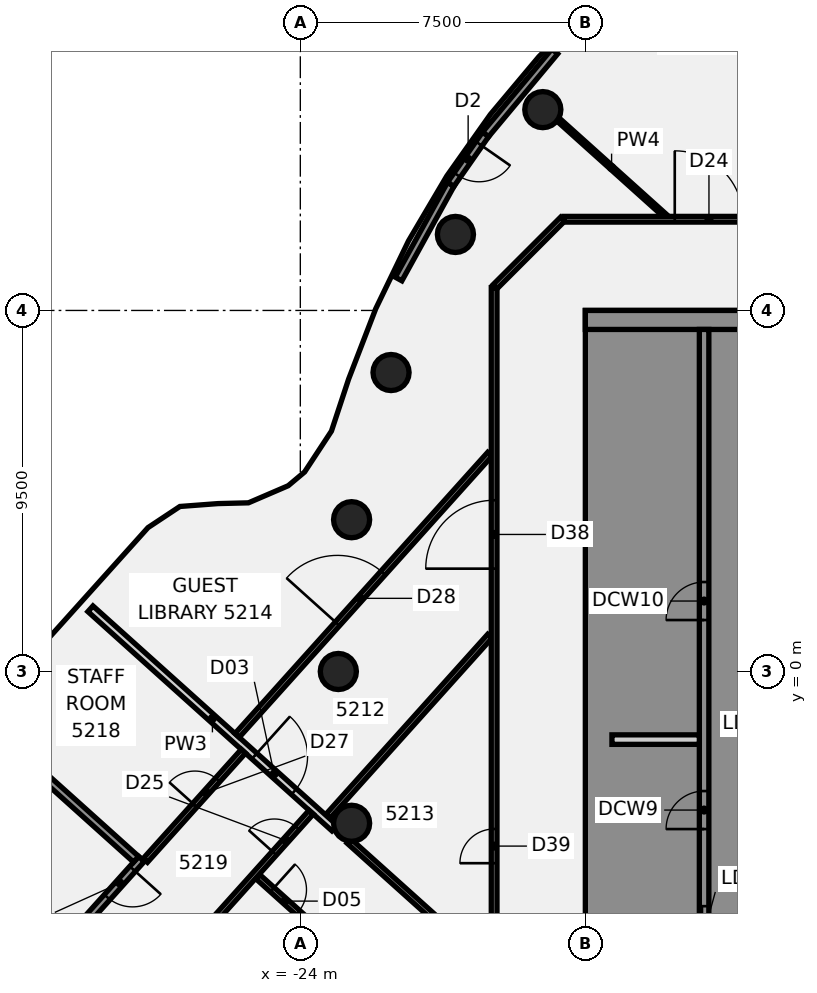
"""IFC4 building model, lengths in metres.
Left out: names, types, materials, properties, quantities, classifications, styles, units other than length and angle.
Written with IfcOpenShell. Run it as: python <this file> out.ifc"""

import sys

from ifc_helpers import new_model, si_unit, direction, frame, frame_2d, origin, origin_2d, place, context, subcontext, project, spatial, polyline, rectangle, circle, outline, extrude, element, fill, save


model = new_model("IFC4")
c1 = context("Model", 3, precision=1e-05, world=origin(), true_north=direction((0.0, 1.0)))
c2 = subcontext(c1, "Body", "Model", "MODEL_VIEW")
j1 = project(units=[si_unit("LENGTHUNIT", "METRE"), si_unit("PLANEANGLEUNIT", "RADIAN")], contexts=[c1])
p1 = place(None, origin())
s1 = spatial("IfcSite", under=j1, at=p1, CompositionType="ELEMENT")
p2 = place(p1, origin())
s2 = spatial("IfcBuilding", under=s1, at=p2, CompositionType="ELEMENT")
p3 = place(p2, frame((0.0, 0.0, 207.7)))
s3 = spatial("IfcBuildingStorey", under=s2, at=p3, CompositionType="ELEMENT", Elevation=207.7)
for number, where, z_axis, x_axis in (
    (1, (-17.619, 14.784, -0.14), (0.0, 0.0, 1.0), (1.0, 0.0, 0.0)),
    (2, (-19.919, 11.5, -0.14), (0.0, 0.0, 1.0), (1.0, 0.0, 0.0)),
    (3, (-21.613, 7.866, -0.14), (0.0, 0.0, 1.0), (1.0, 0.0, 0.0)),
    (4, (-22.651, 3.994, -0.14), (0.0, 0.0, 1.0), (1.0, 0.0, 0.0)),
    (5, (-23.0, 0.0, -0.14), (0.0, 0.0, 1.0), (1.0, 0.0, 0.0)),
    (6, (-22.651, -3.994, -0.14), (0.0, 0.0, 1.0), (1.0, 0.0, 0.0)),
):
    element("IfcColumn", number, at=place(p3, frame(where, z_axis=z_axis, x_axis=x_axis)), inside=s3, PredefinedType="COLUMN", context=c2, shape_type="SweptSolid", body=[
        extrude(circle(Radius=0.475, at=origin_2d()), origin(), (0.0, 0.0, 1.0), 3.6),
    ])
p4 = place(p3, frame((-29.523, 1.65, 0.0), z_axis=(0.0, 0.0, 1.0), x_axis=(0.743912674532, -0.668276838346, 0.0)))
e7 = element("IfcWall", 7, at=p4, inside=s3, PredefinedType="PARTITIONING", context=c2, shape_type="SweptSolid", body=[
    extrude(rectangle(XDim=8.631, YDim=0.2, at=frame_2d((4.316, 0.0))), origin(), (0.0, 0.0, 1.0), 2.864),
])
p5 = place(p4, frame((5.8, 0.0, 0.0)))
e8 = element("IfcOpeningElement", 8, at=p5, cuts=e7, PredefinedType="OPENING", context=c2, shape_type="SweptSolid", body=[
    extrude(rectangle(XDim=1.4, YDim=2.1, at=frame_2d((0.7, 1.05))), frame((0.0, 0.11, 0.0), z_axis=(0.0, -1.0, 0.0), x_axis=(1.0, 0.0, 0.0)), (0.0, 0.0, 1.0), 0.22),
])
p6 = place(p3, frame((-22.722, -4.46, 0.0), z_axis=(0.0, 0.0, 1.0), x_axis=(0.743940554758, -0.668245801323, 0.0)))
e9 = element("IfcWall", 9, at=p6, inside=s3, PredefinedType="PARTITIONING", context=c2, shape_type="SweptSolid", body=[
    extrude(rectangle(XDim=4.993, YDim=0.15, at=frame_2d((2.497, 0.0))), origin(), (0.0, 0.0, 1.0), 2.864),
])
p7 = place(p3, frame((-25.125, -5.394, 0.0), z_axis=(0.0, 0.0, 1.0), x_axis=(0.743993991254, -0.668186307087, 0.0)))
e10 = element("IfcWall", 10, at=p7, inside=s3, PredefinedType="PARTITIONING", context=c2, shape_type="SweptSolid", body=[
    extrude(rectangle(XDim=2.444, YDim=0.15, at=frame_2d((1.222, 0.0))), origin(), (0.0, 0.0, 1.0), 2.864),
])
p8 = place(p7, frame((0.52, 0.0, 0.0)))
e11 = element("IfcOpeningElement", 11, at=p8, cuts=e10, PredefinedType="OPENING", context=c2, shape_type="SweptSolid", body=[
    extrude(rectangle(XDim=0.9, YDim=2.1, at=frame_2d((0.45, 1.05))), frame((0.0, 0.085, 0.0), z_axis=(0.0, -1.0, 0.0), x_axis=(1.0, 0.0, 0.0)), (0.0, 0.0, 1.0), 0.17),
])
p9 = place(p3, frame((-17.217, 14.523, 0.0), z_axis=(0.0, 0.0, 1.0), x_axis=(0.743919147791, -0.668269632372, 0.0)))
e12 = element("IfcWall", 12, at=p9, inside=s3, PredefinedType="PARTITIONING", context=c2, shape_type="SweptSolid", body=[
    extrude(rectangle(XDim=3.786, YDim=0.1, at=frame_2d((1.893, 0.0))), origin(), (0.0, 0.0, 1.0), 2.864),
])
p10 = place(p3, frame((-17.065, 11.9, 0.0), z_axis=(0.0, 0.0, 1.0), x_axis=(1.0, 0.0, 0.0)))
e13 = element("IfcWall", 13, at=p10, inside=s3, PredefinedType="PARTITIONING", context=c2, shape_type="SweptSolid", body=[
    extrude(rectangle(XDim=34.165, YDim=0.15, at=frame_2d((17.083, 0.0))), origin(), (0.0, 0.0, 1.0), 2.864),
])
p11 = place(p10, frame((24.119, 0.0, 0.0)))
e14 = element("IfcOpeningElement", 14, at=p11, cuts=e13, PredefinedType="OPENING", context=c2, shape_type="SweptSolid", body=[
    extrude(rectangle(XDim=1.8, YDim=2.1, at=frame_2d((0.9, 1.05))), frame((0.0, 0.085, 0.0), z_axis=(0.0, -1.0, 0.0), x_axis=(1.0, 0.0, 0.0)), (0.0, 0.0, 1.0), 0.17),
])
p12 = place(p10, frame((8.918, 0.0, 0.0)))
e15 = element("IfcOpeningElement", 15, at=p12, cuts=e13, PredefinedType="OPENING", context=c2, shape_type="SweptSolid", body=[
    extrude(rectangle(XDim=1.8, YDim=2.1, at=frame_2d((0.9, 1.05))), frame((0.0, 0.085, 0.0), z_axis=(0.0, -1.0, 0.0), x_axis=(1.0, 0.0, 0.0)), (0.0, 0.0, 1.0), 0.17),
])
p13 = place(p10, frame((2.918, 0.0, 0.0)))
e16 = element("IfcOpeningElement", 16, at=p13, cuts=e13, PredefinedType="OPENING", context=c2, shape_type="SweptSolid", body=[
    extrude(rectangle(XDim=1.8, YDim=2.1, at=frame_2d((0.9, 1.05))), frame((0.0, 0.085, 0.0), z_axis=(0.0, -1.0, 0.0), x_axis=(1.0, 0.0, 0.0)), (0.0, 0.0, 1.0), 0.17),
])
p14 = place(p3, frame((-18.872, 10.128, 0.0), z_axis=(0.0, 0.0, 1.0), x_axis=(0.707106781187, 0.707106781187, 0.0)))
e17 = element("IfcWall", 17, at=p14, inside=s3, PredefinedType="PARTITIONING", context=c2, shape_type="SweptSolid", body=[
    extrude(rectangle(XDim=2.505, YDim=0.15, at=frame_2d((1.253, 0.0))), origin(), (0.0, 0.0, 1.0), 2.864),
])
p15 = place(p3, frame((-29.608, -10.263, 0.0), z_axis=(0.0, 0.0, 1.0), x_axis=(0.668251718521, 0.743935239583, 0.0)))
e18 = element("IfcWall", 18, at=p15, inside=s3, PredefinedType="PARTITIONING", context=c2, shape_type="SweptSolid", body=[
    extrude(rectangle(XDim=8.819, YDim=0.15, at=frame_2d((4.41, 0.0))), origin(), (0.0, 0.0, 1.0), 2.864),
])
p16 = place(p15, frame((7.369, 0.0, 0.0)))
e19 = element("IfcOpeningElement", 19, at=p16, cuts=e18, PredefinedType="OPENING", context=c2, shape_type="SweptSolid", body=[
    extrude(rectangle(XDim=0.9, YDim=2.1, at=frame_2d((0.45, 1.05))), frame((0.0, 0.085, 0.0), z_axis=(0.0, -1.0, 0.0), x_axis=(1.0, 0.0, 0.0)), (0.0, 0.0, 1.0), 0.17),
])
p17 = place(p15, frame((0.82, 0.0, 0.0)))
e20 = element("IfcOpeningElement", 20, at=p17, cuts=e18, PredefinedType="OPENING", context=c2, shape_type="SweptSolid", body=[
    extrude(rectangle(XDim=0.9, YDim=2.1, at=frame_2d((0.45, 1.05))), frame((0.0, 0.085, 0.0), z_axis=(0.0, -1.0, 0.0), x_axis=(1.0, 0.0, 0.0)), (0.0, 0.0, 1.0), 0.17),
])
p18 = place(p3, frame((-28.078, -4.97, 0.0), z_axis=(0.0, 0.0, 1.0), x_axis=(0.668366899889, 0.743831759965, 0.0)))
e21 = element("IfcWall", 21, at=p18, inside=s3, PredefinedType="PARTITIONING", context=c2, shape_type="SweptSolid", body=[
    extrude(rectangle(XDim=3.86, YDim=0.15, at=frame_2d((1.93, 0.0))), origin(), (0.0, 0.0, 1.0), 2.864),
])
p19 = place(p18, frame((1.95, 0.0, 0.0)))
e22 = element("IfcOpeningElement", 22, at=p19, cuts=e21, PredefinedType="OPENING", context=c2, shape_type="SweptSolid", body=[
    extrude(rectangle(XDim=0.9, YDim=2.1, at=frame_2d((0.45, 1.05))), frame((0.0, 0.085, 0.0), z_axis=(0.0, -1.0, 0.0), x_axis=(1.0, 0.0, 0.0)), (0.0, 0.0, 1.0), 0.17),
])
p20 = place(p3, frame((-25.663, -1.683, 0.0), z_axis=(0.0, 0.0, 1.0), x_axis=(0.668369322351, 0.743829583265, 0.0)))
e23 = element("IfcWall", 23, at=p20, inside=s3, PredefinedType="PARTITIONING", context=c2, shape_type="SweptSolid", body=[
    extrude(rectangle(XDim=9.949, YDim=0.15, at=frame_2d((4.974, 0.0))), origin(), (0.0, 0.0, 1.0), 2.864),
])
p21 = place(p20, frame((3.95, 0.0, 0.0)))
e24 = element("IfcOpeningElement", 24, at=p21, cuts=e23, PredefinedType="OPENING", context=c2, shape_type="SweptSolid", body=[
    extrude(rectangle(XDim=1.8, YDim=2.1, at=frame_2d((0.9, 1.05))), frame((0.0, 0.085, 0.0), z_axis=(0.0, -1.0, 0.0), x_axis=(1.0, 0.0, 0.0)), (0.0, 0.0, 1.0), 0.17),
])
p22 = place(p3, frame((-23.27, -3.807, 0.0), z_axis=(0.0, 0.0, 1.0), x_axis=(0.668392601197, 0.74380866536, 0.0)))
e25 = element("IfcWall", 25, at=p22, inside=s3, PredefinedType="PARTITIONING", context=c2, shape_type="SweptSolid", body=[
    extrude(rectangle(XDim=6.368, YDim=0.15, at=frame_2d((3.184, 0.0))), origin(), (0.0, 0.0, 1.0), 2.864),
])
p23 = place(p3, frame((-18.9, -10.1, 0.0), z_axis=(0.0, 0.0, 1.0), x_axis=(0.0, 1.0, 0.0)))
e26 = element("IfcWall", 26, at=p23, inside=s3, PredefinedType="PARTITIONING", context=c2, shape_type="SweptSolid", body=[
    extrude(rectangle(XDim=20.2, YDim=0.15, at=frame_2d((10.1, 0.0))), origin(), (0.0, 0.0, 1.0), 2.864),
])
p24 = place(p23, frame((12.806, 0.0, 0.0)))
e27 = element("IfcOpeningElement", 27, at=p24, cuts=e26, PredefinedType="OPENING", context=c2, shape_type="SweptSolid", body=[
    extrude(rectangle(XDim=1.8, YDim=2.1, at=frame_2d((0.9, 1.05))), frame((0.0, 0.085, 0.0), z_axis=(0.0, -1.0, 0.0), x_axis=(1.0, 0.0, 0.0)), (0.0, 0.0, 1.0), 0.17),
])
p25 = place(p23, frame((5.056, 0.0, 0.0)))
e28 = element("IfcOpeningElement", 28, at=p25, cuts=e26, PredefinedType="OPENING", context=c2, shape_type="SweptSolid", body=[
    extrude(rectangle(XDim=0.9, YDim=2.1, at=frame_2d((0.45, 1.05))), frame((0.0, 0.085, 0.0), z_axis=(0.0, -1.0, 0.0), x_axis=(1.0, 0.0, 0.0)), (0.0, 0.0, 1.0), 0.17),
])
p26 = place(p3, frame((-17.304, 16.315, 0.0), z_axis=(0.0, 0.0, 1.0), x_axis=(-0.640631790318, -0.767848233203, 0.0)))
e29 = element("IfcWall", 29, at=p26, inside=s3, PredefinedType="SOLIDWALL", context=c2, shape_type="SweptSolid", body=[
    extrude(rectangle(XDim=2.844, YDim=0.2, at=frame_2d((1.422, 0.0))), origin(), (0.0, 0.0, 1.0), 3.46),
])
p27 = place(p3, frame((-20.042, 12.82, 0.0), z_axis=(0.0, 0.0, 1.0), x_axis=(-0.482827762378, -0.87571533724, 0.0)))
e30 = element("IfcWall", 30, at=p27, inside=s3, PredefinedType="SOLIDWALL", context=c2, shape_type="SweptSolid", body=[
    extrude(rectangle(XDim=2.845, YDim=0.2, at=frame_2d((1.422, 0.0))), origin(), (0.0, 0.0, 1.0), 3.46),
])
p28 = place(p3, frame((-19.126, 14.132, 0.0), z_axis=(0.0, 0.0, 1.0), x_axis=(-0.572150562029, -0.820148605053, 0.0)))
e31 = element("IfcWall", 31, at=p28, inside=s3, PredefinedType="SOLIDWALL", context=c2, shape_type="SweptSolid", body=[
    extrude(rectangle(XDim=1.6, YDim=0.2, at=frame_2d((0.8, 0.0))), origin(), (0.0, 0.0, 1.0), 3.46),
])
p29 = place(p28, frame((0.3, 0.0, 0.0)))
e32 = element("IfcOpeningElement", 32, at=p29, cuts=e31, PredefinedType="OPENING", context=c2, shape_type="SweptSolid", body=[
    extrude(rectangle(XDim=1.0, YDim=2.4, at=frame_2d((0.5, 1.2))), frame((0.0, 0.11, 0.0), z_axis=(0.0, -1.0, 0.0), x_axis=(1.0, 0.0, 0.0)), (0.0, 0.0, 1.0), 0.22),
])
p30 = place(p3, origin())
e33 = element("IfcWall", 33, at=p30, inside=s3, PredefinedType="SHEAR", context=c2, shape_type="SweptSolid", body=[
    extrude(outline(polyline([(-13.5, -8.125), (-16.0, -8.125), (-16.0, -5.625), (-13.5, -5.625), (-13.5, -5.375), (-16.0, -5.375), (-16.0, 5.375), (-13.5, 5.375), (-13.5, 5.625), (-16.0, 5.625), (-16.0, 8.125), (-13.5, 8.125), (-13.5, 9.0), (-16.0, 9.0), (-16.5, 9.0), (-16.5, -9.0), (-16.0, -9.0), (-13.5, -9.0), (-13.5, -8.125)])), origin(), (0.0, 0.0, 1.0), 3.46),
])
p31 = place(p3, frame((-16.5, 9.25, 0.0), z_axis=(0.0, 0.0, 1.0), x_axis=(1.0, 0.0, 0.0)))
e34 = element("IfcWall", 34, at=p31, inside=s3, PredefinedType="SHEAR", context=c2, shape_type="SweptSolid", body=[
    extrude(rectangle(XDim=13.0, YDim=0.5, at=frame_2d((6.5, 0.0))), origin(), (0.0, 0.0, 1.0), 3.46),
])
p32 = place(p3, frame((-13.375, -9.0, 0.0), z_axis=(0.0, 0.0, 1.0), x_axis=(0.0, 1.0, 0.0)))
e35 = element("IfcWall", 35, at=p32, inside=s3, PredefinedType="SHEAR", context=c2, shape_type="SweptSolid", body=[
    extrude(rectangle(XDim=18.0, YDim=0.25, at=frame_2d((9.0, 0.0))), origin(), (0.0, 0.0, 1.0), 3.46),
])
p33 = place(p32, frame((1.425, 0.0, 0.0)))
e36 = element("IfcOpeningElement", 36, at=p33, cuts=e35, PredefinedType="OPENING", context=c2, shape_type="SweptSolid", body=[
    extrude(rectangle(XDim=1.4, YDim=2.1, at=frame_2d((0.7, 1.05))), frame((0.0, 0.135, 0.0), z_axis=(0.0, -1.0, 0.0), x_axis=(1.0, 0.0, 0.0)), (0.0, 0.0, 1.0), 0.27),
])
p34 = place(p32, frame((4.854, 0.0, 0.0)))
e37 = element("IfcOpeningElement", 37, at=p34, cuts=e35, PredefinedType="OPENING", context=c2, shape_type="SweptSolid", body=[
    extrude(rectangle(XDim=1.0, YDim=2.1, at=frame_2d((0.5, 1.05))), frame((0.0, 0.135, 0.0), z_axis=(0.0, -1.0, 0.0), x_axis=(1.0, 0.0, 0.0)), (0.0, 0.0, 1.0), 0.27),
])
p35 = place(p32, frame((10.354, 0.0, 0.0)))
e38 = element("IfcOpeningElement", 38, at=p35, cuts=e35, PredefinedType="OPENING", context=c2, shape_type="SweptSolid", body=[
    extrude(rectangle(XDim=1.0, YDim=2.1, at=frame_2d((0.5, 1.05))), frame((0.0, 0.135, 0.0), z_axis=(0.0, -1.0, 0.0), x_axis=(1.0, 0.0, 0.0)), (0.0, 0.0, 1.0), 0.27),
])
p36 = place(p3, frame((-15.8, -1.792, 0.0), z_axis=(0.0, 0.0, 1.0), x_axis=(1.0, 0.0, 0.0)))
e39 = element("IfcWall", 39, at=p36, inside=s3, PredefinedType="PARTITIONING", context=c2, shape_type="SweptSolid", body=[
    extrude(rectangle(XDim=2.3, YDim=0.25, at=frame_2d((1.15, 0.0))), origin(), (0.0, 0.0, 1.0), 3.46),
])
p37 = place(p3, frame((-28.18, -4.933, -0.14), z_axis=(0.0, 0.0, 1.0), x_axis=(-0.66832831342, -0.743866429865, 0.0)))
e40 = element("IfcWall", 40, at=p37, inside=s3, PredefinedType="SHEAR", context=c2, shape_type="SweptSolid", body=[
    extrude(rectangle(XDim=6.7, YDim=0.2, at=frame_2d((3.35, 0.0))), origin(), (0.0, 0.0, 1.0), 3.004),
])
p38 = place(p37, frame((0.35, 0.0, 0.0)))
e41 = element("IfcOpeningElement", 41, at=p38, cuts=e40, PredefinedType="OPENING", context=c2, shape_type="SweptSolid", body=[
    extrude(rectangle(XDim=1.0, YDim=2.1, at=frame_2d((0.5, 1.05))), frame((0.0, 0.11, 0.0), z_axis=(0.0, -1.0, 0.0), x_axis=(1.0, 0.0, 0.0)), (0.0, 0.0, 1.0), 0.22),
])
p39 = place(p3, frame((-30.702, -2.802, -0.14), z_axis=(0.0, 0.0, 1.0), x_axis=(0.743824989784, -0.66837443441, 0.0)))
e42 = element("IfcWall", 42, at=p39, inside=s3, PredefinedType="SHEAR", context=c2, shape_type="SweptSolid", body=[
    extrude(rectangle(XDim=3.2, YDim=0.2, at=frame_2d((1.6, 0.0))), origin(), (0.0, 0.0, 1.0), 3.004),
])
p40 = place(p5, origin())
e43 = element("IfcDoor", 43, at=p40, inside=s3, OperationType="DOUBLE_DOOR_SINGLE_SWING", PredefinedType="DOOR", context=c2, shape_type="SweptSolid", body=[
    extrude(rectangle(XDim=1.4, YDim=2.1, at=frame_2d((0.7, 1.05))), frame((0.0, 0.025, 0.0), z_axis=(0.0, -1.0, 0.0), x_axis=(1.0, 0.0, 0.0)), (0.0, 0.0, 1.0), 0.05),
])
fill(e8, e43)
p41 = place(p8, frame((0.9, 0.0, 0.0), z_axis=(0.0, 0.0, 1.0), x_axis=(-1.0, 0.0, 0.0)))
e44 = element("IfcDoor", 44, at=p41, inside=s3, OperationType="SINGLE_SWING_LEFT", PredefinedType="DOOR", context=c2, shape_type="SweptSolid", body=[
    extrude(rectangle(XDim=0.9, YDim=2.1, at=frame_2d((0.45, 1.05))), frame((0.0, 0.025, 0.0), z_axis=(0.0, -1.0, 0.0), x_axis=(1.0, 0.0, 0.0)), (0.0, 0.0, 1.0), 0.05),
])
fill(e11, e44)
p42 = place(p13, origin())
e45 = element("IfcDoor", 45, at=p42, inside=s3, OperationType="DOUBLE_DOOR_SINGLE_SWING", PredefinedType="DOOR", context=c2, shape_type="SweptSolid", body=[
    extrude(rectangle(XDim=1.8, YDim=2.1, at=frame_2d((0.9, 1.05))), frame((0.0, 0.025, 0.0), z_axis=(0.0, -1.0, 0.0), x_axis=(1.0, 0.0, 0.0)), (0.0, 0.0, 1.0), 0.05),
])
fill(e16, e45)
p43 = place(p16, frame((0.9, 0.0, 0.0), z_axis=(0.0, 0.0, 1.0), x_axis=(-1.0, 0.0, 0.0)))
e46 = element("IfcDoor", 46, at=p43, inside=s3, OperationType="SINGLE_SWING_RIGHT", PredefinedType="DOOR", context=c2, shape_type="SweptSolid", body=[
    extrude(rectangle(XDim=0.9, YDim=2.1, at=frame_2d((0.45, 1.05))), frame((0.0, 0.025, 0.0), z_axis=(0.0, -1.0, 0.0), x_axis=(1.0, 0.0, 0.0)), (0.0, 0.0, 1.0), 0.05),
])
fill(e19, e46)
p44 = place(p19, origin())
e47 = element("IfcDoor", 47, at=p44, inside=s3, OperationType="SINGLE_SWING_LEFT", PredefinedType="DOOR", context=c2, shape_type="SweptSolid", body=[
    extrude(rectangle(XDim=0.9, YDim=2.1, at=frame_2d((0.45, 1.05))), frame((0.0, 0.025, 0.0), z_axis=(0.0, -1.0, 0.0), x_axis=(1.0, 0.0, 0.0)), (0.0, 0.0, 1.0), 0.05),
])
fill(e22, e47)
p45 = place(p21, origin())
e48 = element("IfcDoor", 48, at=p45, inside=s3, OperationType="DOUBLE_DOOR_SINGLE_SWING", PredefinedType="DOOR", context=c2, shape_type="SweptSolid", body=[
    extrude(rectangle(XDim=1.8, YDim=2.1, at=frame_2d((0.9, 1.05))), frame((0.0, 0.025, 0.0), z_axis=(0.0, -1.0, 0.0), x_axis=(1.0, 0.0, 0.0)), (0.0, 0.0, 1.0), 0.05),
])
fill(e24, e48)
p46 = place(p24, frame((1.8, 0.0, 0.0), z_axis=(0.0, 0.0, 1.0), x_axis=(-1.0, 0.0, 0.0)))
e49 = element("IfcDoor", 49, at=p46, inside=s3, OperationType="DOUBLE_DOOR_SINGLE_SWING", PredefinedType="DOOR", context=c2, shape_type="SweptSolid", body=[
    extrude(rectangle(XDim=1.8, YDim=2.1, at=frame_2d((0.9, 1.05))), frame((0.0, 0.025, 0.0), z_axis=(0.0, -1.0, 0.0), x_axis=(1.0, 0.0, 0.0)), (0.0, 0.0, 1.0), 0.05),
])
fill(e27, e49)
p47 = place(p25, origin())
e50 = element("IfcDoor", 50, at=p47, inside=s3, OperationType="SINGLE_SWING_RIGHT", PredefinedType="DOOR", context=c2, shape_type="SweptSolid", body=[
    extrude(rectangle(XDim=0.9, YDim=2.1, at=frame_2d((0.45, 1.05))), frame((0.0, 0.025, 0.0), z_axis=(0.0, -1.0, 0.0), x_axis=(1.0, 0.0, 0.0)), (0.0, 0.0, 1.0), 0.05),
])
fill(e28, e50)
p48 = place(p29, origin())
e51 = element("IfcDoor", 51, at=p48, inside=s3, OperationType="SINGLE_SWING_LEFT", PredefinedType="DOOR", context=c2, shape_type="SweptSolid", body=[
    extrude(rectangle(XDim=1.0, YDim=2.4, at=frame_2d((0.5, 1.2))), frame((0.0, 0.025, 0.0), z_axis=(0.0, -1.0, 0.0), x_axis=(1.0, 0.0, 0.0)), (0.0, 0.0, 1.0), 0.05),
])
fill(e32, e51)
p49 = place(p33, origin())
e52 = element("IfcDoor", 52, at=p49, inside=s3, OperationType="SLIDING_TO_LEFT", PredefinedType="DOOR", context=c2, shape_type="SweptSolid", body=[
    extrude(rectangle(XDim=1.4, YDim=2.1, at=frame_2d((0.7, 1.05))), frame((0.0, 0.025, 0.0), z_axis=(0.0, -1.0, 0.0), x_axis=(1.0, 0.0, 0.0)), (0.0, 0.0, 1.0), 0.05),
])
fill(e36, e52)
p50 = place(p34, origin())
e53 = element("IfcDoor", 53, at=p50, inside=s3, OperationType="SINGLE_SWING_LEFT", PredefinedType="DOOR", context=c2, shape_type="SweptSolid", body=[
    extrude(rectangle(XDim=1.0, YDim=2.1, at=frame_2d((0.5, 1.05))), frame((0.0, 0.025, 0.0), z_axis=(0.0, -1.0, 0.0), x_axis=(1.0, 0.0, 0.0)), (0.0, 0.0, 1.0), 0.05),
])
fill(e37, e53)
p51 = place(p35, origin())
e54 = element("IfcDoor", 54, at=p51, inside=s3, OperationType="SINGLE_SWING_LEFT", PredefinedType="DOOR", context=c2, shape_type="SweptSolid", body=[
    extrude(rectangle(XDim=1.0, YDim=2.1, at=frame_2d((0.5, 1.05))), frame((0.0, 0.025, 0.0), z_axis=(0.0, -1.0, 0.0), x_axis=(1.0, 0.0, 0.0)), (0.0, 0.0, 1.0), 0.05),
])
fill(e38, e54)
p52 = place(p38, origin())
e55 = element("IfcDoor", 55, at=p52, inside=s3, OperationType="SINGLE_SWING_LEFT", PredefinedType="DOOR", context=c2, shape_type="SweptSolid", body=[
    extrude(rectangle(XDim=1.0, YDim=2.1, at=frame_2d((0.5, 1.05))), frame((0.0, 0.025, 0.0), z_axis=(0.0, -1.0, 0.0), x_axis=(1.0, 0.0, 0.0)), (0.0, 0.0, 1.0), 0.05),
])
fill(e41, e55)
save(model, sys.argv[1])
